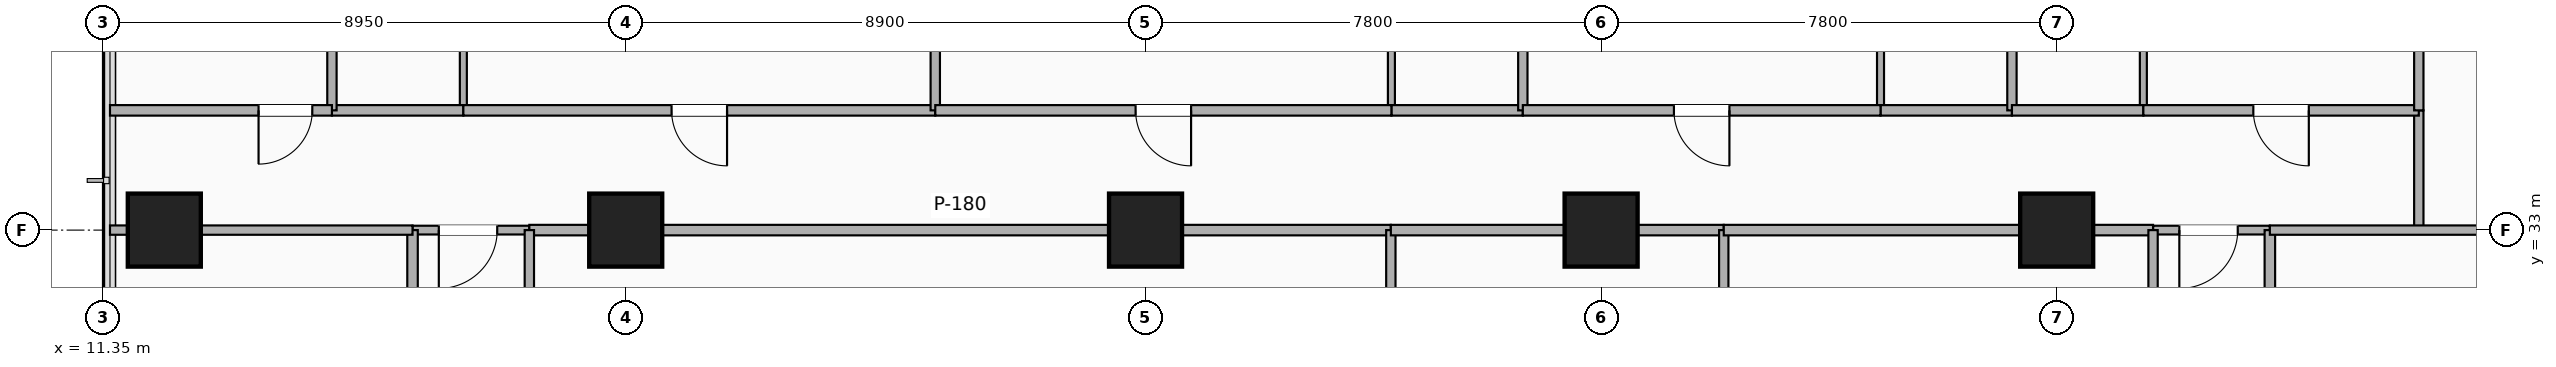
"""IFC4 building model, lengths in metres.
Left out: names, types, materials, properties, quantities, classifications, styles, units other than length and angle.
Written with IfcOpenShell. Run it as: python <this file> out.ifc"""

import sys

from ifc_helpers import new_model, si_unit, direction, frame, frame_2d, origin, origin_2d, place, context, subcontext, project, spatial, rectangle, extrude, element, fill, save


model = new_model("IFC4")
c1 = context("Model", 3, precision=1e-05, world=origin(), true_north=direction((0.0, 1.0)))
c2 = subcontext(c1, "Body", "Model", "MODEL_VIEW")
j1 = project(units=[si_unit("LENGTHUNIT", "METRE"), si_unit("PLANEANGLEUNIT", "RADIAN")], contexts=[c1])
p1 = place(None, origin())
s1 = spatial("IfcSite", under=j1, at=p1, CompositionType="ELEMENT")
p2 = place(p1, origin())
s2 = spatial("IfcBuilding", under=s1, at=p2, CompositionType="ELEMENT")
p3 = place(p2, frame((0.0, 0.0, 95.2)))
s3 = spatial("IfcBuildingStorey", under=s2, at=p3, CompositionType="ELEMENT", Elevation=95.2)
for number, where, z_axis, x_axis in (
    (1, (20.3, 33.0, -0.26), (0.0, 0.0, 1.0), (1.0, 0.0, 0.0)),
    (2, (29.2, 33.0, -0.26), (0.0, 0.0, 1.0), (1.0, 0.0, 0.0)),
    (3, (37.0, 33.0, -0.26), (0.0, 0.0, 1.0), (1.0, 0.0, 0.0)),
    (4, (44.8, 33.0, -0.26), (0.0, 0.0, 1.0), (1.0, 0.0, 0.0)),
    (5, (12.4, 33.0, -0.26), (0.0, 0.0, 1.0), (1.0, 0.0, 0.0)),
):
    element("IfcColumn", number, at=place(p3, frame(where, z_axis=z_axis, x_axis=x_axis)), inside=s3, PredefinedType="COLUMN", context=c2, shape_type="SweptSolid", body=[
        extrude(rectangle(XDim=1.25, YDim=1.25, at=origin_2d()), origin(), (0.0, 0.0, 1.0), 3.5),
    ])
p4 = place(p3, frame((16.65, 33.0, 0.0), z_axis=(0.0, 0.0, 1.0), x_axis=(1.0, 0.0, 0.0)))
e6 = element("IfcWall", 6, at=p4, inside=s3, PredefinedType="PARTITIONING", context=c2, shape_type="SweptSolid", body=[
    extrude(rectangle(XDim=2.0, YDim=0.15, at=frame_2d((1.0, 0.0))), origin(), (0.0, 0.0, 1.0), 2.313),
])
p5 = place(p4, frame((0.45, 0.0, 0.0)))
e7 = element("IfcOpeningElement", 7, at=p5, cuts=e6, PredefinedType="OPENING", context=c2, shape_type="SweptSolid", body=[
    extrude(rectangle(XDim=1.0, YDim=2.15, at=frame_2d((0.5, 1.075))), frame((0.0, 0.085, 0.0), z_axis=(0.0, -1.0, 0.0), x_axis=(1.0, 0.0, 0.0)), (0.0, 0.0, 1.0), 0.17),
])
p6 = place(p3, frame((46.45, 33.0, 0.0), z_axis=(0.0, 0.0, 1.0), x_axis=(1.0, 0.0, 0.0)))
e8 = element("IfcWall", 8, at=p6, inside=s3, PredefinedType="PARTITIONING", context=c2, shape_type="SweptSolid", body=[
    extrude(rectangle(XDim=2.0, YDim=0.15, at=frame_2d((1.0, 0.0))), origin(), (0.0, 0.0, 1.0), 2.313),
])
p7 = place(p6, frame((0.45, 0.0, 0.0)))
e9 = element("IfcOpeningElement", 9, at=p7, cuts=e8, PredefinedType="OPENING", context=c2, shape_type="SweptSolid", body=[
    extrude(rectangle(XDim=1.0, YDim=2.15, at=frame_2d((0.5, 1.075))), frame((0.0, 0.085, 0.0), z_axis=(0.0, -1.0, 0.0), x_axis=(1.0, 0.0, 0.0)), (0.0, 0.0, 1.0), 0.17),
])
p8 = place(p3, frame((51.0, 33.0, 0.0), z_axis=(0.0, 0.0, 1.0), x_axis=(0.0, 1.0, 0.0)))
e10 = element("IfcWall", 10, at=p8, inside=s3, PredefinedType="PARTITIONING", context=c2, shape_type="SweptSolid", body=[
    extrude(rectangle(XDim=2.05, YDim=0.16, at=frame_2d((1.025, 0.0))), origin(), (0.0, 0.0, 1.0), 2.313),
])
p9 = place(p3, frame((18.65, 33.0, 0.0), z_axis=(0.0, 0.0, 1.0), x_axis=(1.0, 0.0, 0.0)))
e11 = element("IfcWall", 11, at=p9, inside=s3, PredefinedType="PARTITIONING", context=c2, shape_type="SweptSolid", body=[
    extrude(rectangle(XDim=14.75, YDim=0.18, at=frame_2d((7.375, 0.0))), origin(), (0.0, 0.0, 1.0), 2.313),
])
p10 = place(p3, frame((18.65, 22.65, 0.0), z_axis=(0.0, 0.0, 1.0), x_axis=(0.0, 1.0, 0.0)))
e12 = element("IfcWall", 12, at=p10, inside=s3, PredefinedType="PARTITIONING", context=c2, shape_type="SweptSolid", body=[
    extrude(rectangle(XDim=10.35, YDim=0.16, at=frame_2d((5.175, 0.0))), origin(), (0.0, 0.0, 1.0), 2.313),
])
p11 = place(p3, frame((33.4, 22.65, 0.0), z_axis=(0.0, 0.0, 1.0), x_axis=(0.0, 1.0, 0.0)))
e13 = element("IfcWall", 13, at=p11, inside=s3, PredefinedType="PARTITIONING", context=c2, shape_type="SweptSolid", body=[
    extrude(rectangle(XDim=10.35, YDim=0.16, at=frame_2d((5.175, 0.0))), origin(), (0.0, 0.0, 1.0), 2.614),
])
p12 = place(p3, frame((33.4, 33.0, 0.0), z_axis=(0.0, 0.0, 1.0), x_axis=(1.0, 0.0, 0.0)))
e14 = element("IfcWall", 14, at=p12, inside=s3, PredefinedType="PARTITIONING", context=c2, shape_type="SweptSolid", body=[
    extrude(rectangle(XDim=5.7, YDim=0.18, at=frame_2d((2.85, 0.0))), origin(), (0.0, 0.0, 1.0), 2.313),
])
p13 = place(p3, frame((39.1, 22.65, 0.0), z_axis=(0.0, 0.0, 1.0), x_axis=(0.0, 1.0, 0.0)))
e15 = element("IfcWall", 15, at=p13, inside=s3, PredefinedType="PARTITIONING", context=c2, shape_type="SweptSolid", body=[
    extrude(rectangle(XDim=10.35, YDim=0.16, at=frame_2d((5.175, 0.0))), origin(), (0.0, 0.0, 1.0), 2.614),
])
p14 = place(p3, frame((39.1, 33.0, 0.0), z_axis=(0.0, 0.0, 1.0), x_axis=(1.0, 0.0, 0.0)))
e16 = element("IfcWall", 16, at=p14, inside=s3, PredefinedType="PARTITIONING", context=c2, shape_type="SweptSolid", body=[
    extrude(rectangle(XDim=7.35, YDim=0.18, at=frame_2d((3.675, 0.0))), origin(), (0.0, 0.0, 1.0), 2.313),
])
p15 = place(p3, frame((46.45, 22.65, 0.0), z_axis=(0.0, 0.0, 1.0), x_axis=(0.0, 1.0, 0.0)))
e17 = element("IfcWall", 17, at=p15, inside=s3, PredefinedType="PARTITIONING", context=c2, shape_type="SweptSolid", body=[
    extrude(rectangle(XDim=10.35, YDim=0.16, at=frame_2d((5.175, 0.0))), origin(), (0.0, 0.0, 1.0), 2.313),
])
p16 = place(p3, frame((17.52, 35.05, 0.0), z_axis=(0.0, 0.0, 1.0), x_axis=(0.0, 1.0, 0.0)))
e18 = element("IfcWall", 18, at=p16, inside=s3, PredefinedType="PARTITIONING", context=c2, shape_type="SweptSolid", body=[
    extrude(rectangle(XDim=2.35, YDim=0.12, at=frame_2d((1.175, 0.0))), origin(), (0.0, 0.0, 1.0), 3.24),
])
p17 = place(p3, frame((15.27, 35.05, 0.0), z_axis=(0.0, 0.0, 1.0), x_axis=(1.0, 0.0, 0.0)))
e19 = element("IfcWall", 19, at=p17, inside=s3, PredefinedType="PARTITIONING", context=c2, shape_type="SweptSolid", body=[
    extrude(rectangle(XDim=2.25, YDim=0.18, at=frame_2d((1.125, 0.0))), origin(), (0.0, 0.0, 1.0), 3.24),
])
p18 = place(p3, frame((17.52, 35.05, 0.0), z_axis=(0.0, 0.0, 1.0), x_axis=(1.0, 0.0, 0.0)))
e20 = element("IfcWall", 20, at=p18, inside=s3, PredefinedType="PARTITIONING", context=c2, shape_type="SweptSolid", body=[
    extrude(rectangle(XDim=8.08, YDim=0.18, at=frame_2d((4.04, 0.0))), origin(), (0.0, 0.0, 1.0), 2.313),
])
p19 = place(p18, frame((3.565, 0.0, 0.0)))
e21 = element("IfcOpeningElement", 21, at=p19, cuts=e20, PredefinedType="OPENING", context=c2, shape_type="SweptSolid", body=[
    extrude(rectangle(XDim=0.95, YDim=2.15, at=frame_2d((0.475, 1.075))), frame((0.0, 0.1, 0.0), z_axis=(0.0, -1.0, 0.0), x_axis=(1.0, 0.0, 0.0)), (0.0, 0.0, 1.0), 0.2),
])
p20 = place(p3, frame((15.27, 35.05, 0.0), z_axis=(0.0, 0.0, 1.0), x_axis=(0.0, 1.0, 0.0)))
e22 = element("IfcWall", 22, at=p20, inside=s3, PredefinedType="PARTITIONING", context=c2, shape_type="SweptSolid", body=[
    extrude(rectangle(XDim=7.53, YDim=0.16, at=frame_2d((3.765, 0.0))), origin(), (0.0, 0.0, 1.0), 3.24),
])
p21 = place(p3, frame((25.6, 35.05, 0.0), z_axis=(0.0, 0.0, 1.0), x_axis=(0.0, 1.0, 0.0)))
e23 = element("IfcWall", 23, at=p21, inside=s3, PredefinedType="PARTITIONING", context=c2, shape_type="SweptSolid", body=[
    extrude(rectangle(XDim=11.33, YDim=0.16, at=frame_2d((5.665, 0.0))), origin(), (0.0, 0.0, 1.0), 2.603),
])
p22 = place(p3, frame((33.41, 35.05, 0.0), z_axis=(0.0, 0.0, 1.0), x_axis=(0.0, 1.0, 0.0)))
e24 = element("IfcWall", 24, at=p22, inside=s3, PredefinedType="PARTITIONING", context=c2, shape_type="SweptSolid", body=[
    extrude(rectangle(XDim=2.35, YDim=0.12, at=frame_2d((1.175, 0.0))), origin(), (0.0, 0.0, 1.0), 2.922),
])
p23 = place(p3, frame((33.41, 35.05, 0.0), z_axis=(0.0, 0.0, 1.0), x_axis=(1.0, 0.0, 0.0)))
e25 = element("IfcWall", 25, at=p23, inside=s3, PredefinedType="PARTITIONING", context=c2, shape_type="SweptSolid", body=[
    extrude(rectangle(XDim=2.25, YDim=0.18, at=frame_2d((1.125, 0.0))), origin(), (0.0, 0.0, 1.0), 3.24),
])
p24 = place(p3, frame((25.6, 35.05, 0.0), z_axis=(0.0, 0.0, 1.0), x_axis=(1.0, 0.0, 0.0)))
e26 = element("IfcWall", 26, at=p24, inside=s3, PredefinedType="PARTITIONING", context=c2, shape_type="SweptSolid", body=[
    extrude(rectangle(XDim=7.81, YDim=0.18, at=frame_2d((3.905, 0.0))), origin(), (0.0, 0.0, 1.0), 2.313),
])
p25 = place(p24, frame((3.43, 0.0, 0.0)))
e27 = element("IfcOpeningElement", 27, at=p25, cuts=e26, PredefinedType="OPENING", context=c2, shape_type="SweptSolid", body=[
    extrude(rectangle(XDim=0.95, YDim=2.15, at=frame_2d((0.475, 1.075))), frame((0.0, 0.1, 0.0), z_axis=(0.0, -1.0, 0.0), x_axis=(1.0, 0.0, 0.0)), (0.0, 0.0, 1.0), 0.2),
])
p26 = place(p3, frame((35.66, 35.05, 0.0), z_axis=(0.0, 0.0, 1.0), x_axis=(0.0, 1.0, 0.0)))
e28 = element("IfcWall", 28, at=p26, inside=s3, PredefinedType="PARTITIONING", context=c2, shape_type="SweptSolid", body=[
    extrude(rectangle(XDim=11.33, YDim=0.16, at=frame_2d((5.665, 0.0))), origin(), (0.0, 0.0, 1.0), 2.603),
])
p27 = place(p3, frame((41.784, 35.05, 0.0), z_axis=(0.0, 0.0, 1.0), x_axis=(0.0, 1.0, 0.0)))
e29 = element("IfcWall", 29, at=p27, inside=s3, PredefinedType="PARTITIONING", context=c2, shape_type="SweptSolid", body=[
    extrude(rectangle(XDim=2.35, YDim=0.12, at=frame_2d((1.175, 0.0))), origin(), (0.0, 0.0, 1.0), 2.922),
])
p28 = place(p3, frame((41.784, 35.05, 0.0), z_axis=(0.0, 0.0, 1.0), x_axis=(1.0, 0.0, 0.0)))
e30 = element("IfcWall", 30, at=p28, inside=s3, PredefinedType="PARTITIONING", context=c2, shape_type="SweptSolid", body=[
    extrude(rectangle(XDim=2.25, YDim=0.18, at=frame_2d((1.125, 0.0))), origin(), (0.0, 0.0, 1.0), 3.24),
])
p29 = place(p3, frame((35.66, 35.05, 0.0), z_axis=(0.0, 0.0, 1.0), x_axis=(1.0, 0.0, 0.0)))
e31 = element("IfcWall", 31, at=p29, inside=s3, PredefinedType="PARTITIONING", context=c2, shape_type="SweptSolid", body=[
    extrude(rectangle(XDim=6.124, YDim=0.18, at=frame_2d((3.062, 0.0))), origin(), (0.0, 0.0, 1.0), 2.313),
])
p30 = place(p29, frame((2.587, 0.0, 0.0)))
e32 = element("IfcOpeningElement", 32, at=p30, cuts=e31, PredefinedType="OPENING", context=c2, shape_type="SweptSolid", body=[
    extrude(rectangle(XDim=0.95, YDim=2.15, at=frame_2d((0.475, 1.075))), frame((0.0, 0.1, 0.0), z_axis=(0.0, -1.0, 0.0), x_axis=(1.0, 0.0, 0.0)), (0.0, 0.0, 1.0), 0.2),
])
p31 = place(p3, frame((44.034, 35.05, 0.0), z_axis=(0.0, 0.0, 1.0), x_axis=(0.0, 1.0, 0.0)))
e33 = element("IfcWall", 33, at=p31, inside=s3, PredefinedType="PARTITIONING", context=c2, shape_type="SweptSolid", body=[
    extrude(rectangle(XDim=11.33, YDim=0.16, at=frame_2d((5.665, 0.0))), origin(), (0.0, 0.0, 1.0), 2.603),
])
p32 = place(p3, frame((46.284, 35.05, 0.0), z_axis=(0.0, 0.0, 1.0), x_axis=(0.0, 1.0, 0.0)))
e34 = element("IfcWall", 34, at=p32, inside=s3, PredefinedType="PARTITIONING", context=c2, shape_type="SweptSolid", body=[
    extrude(rectangle(XDim=2.35, YDim=0.12, at=frame_2d((1.175, 0.0))), origin(), (0.0, 0.0, 1.0), 3.24),
])
p33 = place(p3, frame((44.034, 35.05, 0.0), z_axis=(0.0, 0.0, 1.0), x_axis=(1.0, 0.0, 0.0)))
e35 = element("IfcWall", 35, at=p33, inside=s3, PredefinedType="PARTITIONING", context=c2, shape_type="SweptSolid", body=[
    extrude(rectangle(XDim=2.25, YDim=0.18, at=frame_2d((1.125, 0.0))), origin(), (0.0, 0.0, 1.0), 2.313),
])
p34 = place(p3, frame((46.284, 35.05, 0.0), z_axis=(0.0, 0.0, 1.0), x_axis=(1.0, 0.0, 0.0)))
e36 = element("IfcWall", 36, at=p34, inside=s3, PredefinedType="PARTITIONING", context=c2, shape_type="SweptSolid", body=[
    extrude(rectangle(XDim=4.716, YDim=0.18, at=frame_2d((2.358, 0.0))), origin(), (0.0, 0.0, 1.0), 3.24),
])
p35 = place(p34, frame((1.883, 0.0, 0.0)))
e37 = element("IfcOpeningElement", 37, at=p35, cuts=e36, PredefinedType="OPENING", context=c2, shape_type="SweptSolid", body=[
    extrude(rectangle(XDim=0.95, YDim=2.15, at=frame_2d((0.475, 1.075))), frame((0.0, 0.1, 0.0), z_axis=(0.0, -1.0, 0.0), x_axis=(1.0, 0.0, 0.0)), (0.0, 0.0, 1.0), 0.2),
])
p36 = place(p3, frame((51.0, 35.05, 0.0), z_axis=(0.0, 0.0, 1.0), x_axis=(0.0, 1.0, 0.0)))
e38 = element("IfcWall", 38, at=p36, inside=s3, PredefinedType="PARTITIONING", context=c2, shape_type="SweptSolid", body=[
    extrude(rectangle(XDim=11.33, YDim=0.16, at=frame_2d((5.665, 0.0))), origin(), (0.0, 0.0, 1.0), 3.24),
])
p37 = place(p3, frame((16.65, 29.22, 0.0), z_axis=(0.0, 0.0, 1.0), x_axis=(0.0, 1.0, 0.0)))
e39 = element("IfcWall", 39, at=p37, inside=s3, PredefinedType="PARTITIONING", context=c2, shape_type="SweptSolid", body=[
    extrude(rectangle(XDim=3.78, YDim=0.18, at=frame_2d((1.89, 0.0))), origin(), (0.0, 0.0, 1.0), 2.313),
])
p38 = place(p37, frame((1.415, 0.0, 0.0)))
e40 = element("IfcOpeningElement", 40, at=p38, cuts=e39, PredefinedType="OPENING", context=c2, shape_type="SweptSolid", body=[
    extrude(rectangle(XDim=0.95, YDim=2.15, at=frame_2d((0.475, 1.075))), frame((0.0, 0.1, 0.0), z_axis=(0.0, -1.0, 0.0), x_axis=(1.0, 0.0, 0.0)), (0.0, 0.0, 1.0), 0.2),
])
p39 = place(p3, frame((11.47, 33.0, 0.0), z_axis=(0.0, 0.0, 1.0), x_axis=(1.0, 0.0, 0.0)))
e41 = element("IfcWall", 41, at=p39, inside=s3, PredefinedType="PARTITIONING", context=c2, shape_type="SweptSolid", body=[
    extrude(rectangle(XDim=5.18, YDim=0.16, at=frame_2d((2.59, 0.0))), origin(), (0.0, 0.0, 1.0), 2.313),
])
p40 = place(p3, frame((48.45, 25.55, 0.0), z_axis=(0.0, 0.0, 1.0), x_axis=(0.0, 1.0, 0.0)))
e42 = element("IfcWall", 42, at=p40, inside=s3, PredefinedType="PARTITIONING", context=c2, shape_type="SweptSolid", body=[
    extrude(rectangle(XDim=7.45, YDim=0.18, at=frame_2d((3.725, 0.0))), origin(), (0.0, 0.0, 1.0), 2.313),
])
p41 = place(p40, frame((4.2, 0.0, 0.0), z_axis=(0.0, 0.0, 1.0), x_axis=(-1.0, 0.0, 0.0)))
e43 = element("IfcOpeningElement", 43, at=p41, cuts=e42, PredefinedType="OPENING", context=c2, shape_type="SweptSolid", body=[
    extrude(rectangle(XDim=0.95, YDim=2.15, at=frame_2d((0.475, 1.075))), frame((0.0, 0.1, 0.0), z_axis=(0.0, -1.0, 0.0), x_axis=(1.0, 0.0, 0.0)), (0.0, 0.0, 1.0), 0.2),
])
p42 = place(p3, frame((48.45, 33.0, 0.0), z_axis=(0.0, 0.0, 1.0), x_axis=(1.0, 0.0, 0.0)))
e44 = element("IfcWall", 44, at=p42, inside=s3, PredefinedType="PARTITIONING", context=c2, shape_type="SweptSolid", body=[
    extrude(rectangle(XDim=10.43, YDim=0.16, at=frame_2d((5.215, 0.0))), origin(), (0.0, 0.0, 1.0), 2.313),
])
p43 = place(p3, frame((11.47, 35.05, 0.0), z_axis=(0.0, 0.0, 1.0), x_axis=(1.0, 0.0, 0.0)))
e45 = element("IfcWall", 45, at=p43, inside=s3, PredefinedType="PARTITIONING", context=c2, shape_type="SweptSolid", body=[
    extrude(rectangle(XDim=3.8, YDim=0.18, at=frame_2d((1.9, 0.0))), origin(), (0.0, 0.0, 1.0), 3.24),
])
p44 = place(p43, frame((2.544, 0.0, 0.0)))
e46 = element("IfcOpeningElement", 46, at=p44, cuts=e45, PredefinedType="OPENING", context=c2, shape_type="SweptSolid", body=[
    extrude(rectangle(XDim=0.92, YDim=2.08, at=frame_2d((0.46, 1.04))), frame((0.0, 0.1, 0.0), z_axis=(0.0, -1.0, 0.0), x_axis=(1.0, 0.0, 0.0)), (0.0, 0.0, 1.0), 0.2),
])
p45 = place(p5, origin())
e47 = element("IfcDoor", 47, at=p45, inside=s3, OperationType="SINGLE_SWING_LEFT", PredefinedType="DOOR", context=c2, shape_type="SweptSolid", body=[
    extrude(rectangle(XDim=1.0, YDim=2.15, at=frame_2d((0.5, 1.075))), frame((0.0, 0.025, 0.0), z_axis=(0.0, -1.0, 0.0), x_axis=(1.0, 0.0, 0.0)), (0.0, 0.0, 1.0), 0.05),
])
fill(e7, e47)
p46 = place(p7, origin())
e48 = element("IfcDoor", 48, at=p46, inside=s3, OperationType="SINGLE_SWING_LEFT", PredefinedType="DOOR", context=c2, shape_type="SweptSolid", body=[
    extrude(rectangle(XDim=1.0, YDim=2.15, at=frame_2d((0.5, 1.075))), frame((0.0, 0.025, 0.0), z_axis=(0.0, -1.0, 0.0), x_axis=(1.0, 0.0, 0.0)), (0.0, 0.0, 1.0), 0.05),
])
fill(e9, e48)
p47 = place(p19, origin())
e49 = element("IfcDoor", 49, at=p47, inside=s3, OperationType="SINGLE_SWING_RIGHT", PredefinedType="DOOR", context=c2, shape_type="SweptSolid", body=[
    extrude(rectangle(XDim=0.95, YDim=2.15, at=frame_2d((0.475, 1.075))), frame((0.0, 0.025, 0.0), z_axis=(0.0, -1.0, 0.0), x_axis=(1.0, 0.0, 0.0)), (0.0, 0.0, 1.0), 0.05),
])
fill(e21, e49)
p48 = place(p25, origin())
e50 = element("IfcDoor", 50, at=p48, inside=s3, OperationType="SINGLE_SWING_RIGHT", PredefinedType="DOOR", context=c2, shape_type="SweptSolid", body=[
    extrude(rectangle(XDim=0.95, YDim=2.15, at=frame_2d((0.475, 1.075))), frame((0.0, 0.025, 0.0), z_axis=(0.0, -1.0, 0.0), x_axis=(1.0, 0.0, 0.0)), (0.0, 0.0, 1.0), 0.05),
])
fill(e27, e50)
p49 = place(p30, origin())
e51 = element("IfcDoor", 51, at=p49, inside=s3, OperationType="SINGLE_SWING_RIGHT", PredefinedType="DOOR", context=c2, shape_type="SweptSolid", body=[
    extrude(rectangle(XDim=0.95, YDim=2.15, at=frame_2d((0.475, 1.075))), frame((0.0, 0.025, 0.0), z_axis=(0.0, -1.0, 0.0), x_axis=(1.0, 0.0, 0.0)), (0.0, 0.0, 1.0), 0.05),
])
fill(e32, e51)
p50 = place(p35, origin())
e52 = element("IfcDoor", 52, at=p50, inside=s3, OperationType="SINGLE_SWING_RIGHT", PredefinedType="DOOR", context=c2, shape_type="SweptSolid", body=[
    extrude(rectangle(XDim=0.95, YDim=2.15, at=frame_2d((0.475, 1.075))), frame((0.0, 0.025, 0.0), z_axis=(0.0, -1.0, 0.0), x_axis=(1.0, 0.0, 0.0)), (0.0, 0.0, 1.0), 0.05),
])
fill(e37, e52)
p51 = place(p44, origin())
e53 = element("IfcDoor", 53, at=p51, inside=s3, OperationType="SINGLE_SWING_LEFT", PredefinedType="DOOR", context=c2, shape_type="SweptSolid", body=[
    extrude(rectangle(XDim=0.92, YDim=2.08, at=frame_2d((0.46, 1.04))), frame((0.0, 0.025, 0.0), z_axis=(0.0, -1.0, 0.0), x_axis=(1.0, 0.0, 0.0)), (0.0, 0.0, 1.0), 0.05),
])
fill(e46, e53)
save(model, sys.argv[1])
